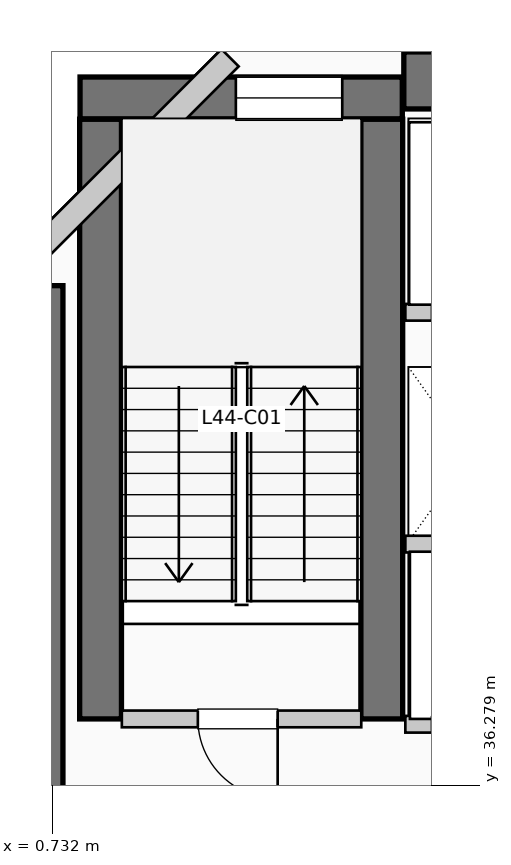
"""IFC4 building model, lengths in metres.
Left out: names, types, materials, properties, quantities, classifications, styles, units other than length and angle.
Written with IfcOpenShell. Run it as: python <this file> out.ifc"""

import sys

from ifc_helpers import new_model, si_unit, direction, frame, frame_2d, origin, place, context, subcontext, project, spatial, rectangle, extrude, element, fill, save


model = new_model("IFC4")
c1 = context("Model", 3, precision=1e-05, world=origin(), true_north=direction((0.0, 1.0)))
c2 = subcontext(c1, "Body", "Model", "MODEL_VIEW")
j1 = project(units=[si_unit("LENGTHUNIT", "METRE"), si_unit("PLANEANGLEUNIT", "RADIAN")], contexts=[c1])
p1 = place(None, origin())
s1 = spatial("IfcSite", under=j1, at=p1, CompositionType="ELEMENT")
p2 = place(p1, origin())
s2 = spatial("IfcBuilding", under=s1, at=p2, CompositionType="ELEMENT")
p3 = place(p2, frame((0.0, 0.0, 183.48)))
s3 = spatial("IfcBuildingStorey", under=s2, at=p3, CompositionType="ELEMENT", Elevation=183.48)
p4 = place(p3, frame((5.36, 45.55, 0.0), z_axis=(0.0, 0.0, 1.0), x_axis=(1.0, 0.0, 0.0)))
e1 = element("IfcWall", 1, at=p4, inside=s3, PredefinedType="SHEAR", context=c2, shape_type="SweptSolid", body=[
    extrude(rectangle(XDim=13.98, YDim=0.75, at=frame_2d((6.99, 0.0))), origin(), (0.0, 0.0, 1.0), 3.96),
])
p5 = place(p3, frame((0.5, 34.95, 0.0), z_axis=(0.0, 0.0, 1.0), x_axis=(0.0, 1.0, 0.0)))
e2 = element("IfcWall", 2, at=p5, inside=s3, PredefinedType="SHEAR", context=c2, shape_type="SweptSolid", body=[
    extrude(rectangle(XDim=7.9, YDim=0.75, at=frame_2d((3.95, 0.0))), origin(), (0.0, 0.0, 1.0), 3.96),
])
for number, where, z_axis, x_axis in (
    (3, (1.37, 37.15, 0.0), (0.0, 0.0, 1.0), (0.0, 1.0, 0.0)),
    (4, (5.07, 37.15, 0.0), (0.0, 0.0, 1.0), (0.0, 1.0, 0.0)),
):
    element("IfcWall", number, at=place(p3, frame(where, z_axis=z_axis, x_axis=x_axis)), inside=s3, PredefinedType="SHEAR", context=c2, shape_type="SweptSolid", body=[
        extrude(rectangle(XDim=7.89, YDim=0.55, at=frame_2d((3.945, 0.0))), origin(), (0.0, 0.0, 1.0), 3.96),
    ])
p6 = place(p3, frame((1.1, 45.32, 0.0), z_axis=(0.0, 0.0, 1.0), x_axis=(1.0, 0.0, 0.0)))
e5 = element("IfcWall", 5, at=p6, inside=s3, PredefinedType="SHEAR", context=c2, shape_type="SweptSolid", body=[
    extrude(rectangle(XDim=4.24, YDim=0.55, at=frame_2d((2.12, 0.0))), origin(), (0.0, 0.0, 1.0), 3.96),
])
p7 = place(p6, frame((2.05, 0.0, 1.05)))
e6 = element("IfcOpeningElement", 6, at=p7, cuts=e5, PredefinedType="OPENING", context=c2, shape_type="SweptSolid", body=[
    extrude(rectangle(XDim=1.4, YDim=1.8, at=frame_2d((0.7, 0.9))), frame((0.0, 0.285, 0.0), z_axis=(0.0, -1.0, 0.0), x_axis=(1.0, 0.0, 0.0)), (0.0, 0.0, 1.0), 0.57),
])
p8 = place(p3, frame((3.074, 45.848, 0.0), z_axis=(0.0, 0.0, 1.0), x_axis=(-0.707106781187, -0.707106781187, 0.0)))
e7 = element("IfcWall", 7, at=p8, inside=s3, PredefinedType="SOLIDWALL", context=c2, shape_type="SweptSolid", body=[
    extrude(rectangle(XDim=4.133, YDim=0.32, at=frame_2d((2.066, 0.0))), origin(), (0.0, 0.0, 1.0), 3.71),
])
p9 = place(p3, frame((1.65, 37.15, 0.0), z_axis=(0.0, 0.0, 1.0), x_axis=(1.0, 0.0, 0.0)))
e8 = element("IfcWall", 8, at=p9, inside=s3, PredefinedType="PARTITIONING", context=c2, shape_type="SweptSolid", body=[
    extrude(rectangle(XDim=3.15, YDim=0.22, at=frame_2d((1.575, 0.0))), origin(), (0.0, 0.0, 1.0), 3.71),
])
p10 = place(p9, frame((2.05, 0.0, 0.0), z_axis=(0.0, 0.0, 1.0), x_axis=(-1.0, 0.0, 0.0)))
e9 = element("IfcOpeningElement", 9, at=p10, cuts=e8, PredefinedType="OPENING", context=c2, shape_type="SweptSolid", body=[
    extrude(rectangle(XDim=1.05, YDim=2.15, at=frame_2d((0.525, 1.075))), frame((0.0, 0.12, 0.0), z_axis=(0.0, -1.0, 0.0), x_axis=(1.0, 0.0, 0.0)), (0.0, 0.0, 1.0), 0.24),
])
p11 = place(p3, frame((5.38, 37.08, 0.0), z_axis=(0.0, 0.0, 1.0), x_axis=(1.0, 0.0, 0.0)))
e10 = element("IfcWall", 10, at=p11, inside=s3, PredefinedType="PARTITIONING", context=c2, shape_type="SweptSolid", body=[
    extrude(rectangle(XDim=3.46, YDim=0.22, at=frame_2d((1.73, 0.0))), origin(), (0.0, 0.0, 1.0), 3.71),
])
p12 = place(p11, frame((1.55, 0.0, 0.0), z_axis=(0.0, 0.0, 1.0), x_axis=(-1.0, 0.0, 0.0)))
e11 = element("IfcOpeningElement", 11, at=p12, cuts=e10, PredefinedType="OPENING", context=c2, shape_type="SweptSolid", body=[
    extrude(rectangle(XDim=1.2, YDim=2.2, at=frame_2d((0.6, 1.1))), frame((0.0, 0.12, 0.0), z_axis=(0.0, -1.0, 0.0), x_axis=(1.0, 0.0, 0.0)), (0.0, 0.0, 1.0), 0.24),
])
p13 = place(p11, frame((3.22, 0.0, 0.0), z_axis=(0.0, 0.0, 1.0), x_axis=(-1.0, 0.0, 0.0)))
e12 = element("IfcOpeningElement", 12, at=p13, cuts=e10, PredefinedType="OPENING", context=c2, shape_type="SweptSolid", body=[
    extrude(rectangle(XDim=1.2, YDim=2.2, at=frame_2d((0.6, 1.1))), frame((0.0, 0.12, 0.0), z_axis=(0.0, -1.0, 0.0), x_axis=(1.0, 0.0, 0.0)), (0.0, 0.0, 1.0), 0.24),
])
p14 = place(p3, frame((5.38, 39.45, 0.0), z_axis=(0.0, 0.0, 1.0), x_axis=(1.0, 0.0, 0.0)))
e13 = element("IfcWall", 13, at=p14, inside=s3, PredefinedType="PARTITIONING", context=c2, shape_type="SweptSolid", body=[
    extrude(rectangle(XDim=3.46, YDim=0.22, at=frame_2d((1.73, 0.0))), origin(), (0.0, 0.0, 1.0), 3.71),
])
p15 = place(p3, frame((5.38, 42.5, 0.0), z_axis=(0.0, 0.0, 1.0), x_axis=(1.0, 0.0, 0.0)))
e14 = element("IfcWall", 14, at=p15, inside=s3, PredefinedType="PARTITIONING", context=c2, shape_type="SweptSolid", body=[
    extrude(rectangle(XDim=3.77, YDim=0.22, at=frame_2d((1.885, 0.0))), origin(), (0.0, 0.0, 1.0), 3.71),
])
p16 = place(p15, frame((1.75, 0.0, 0.0), z_axis=(0.0, 0.0, 1.0), x_axis=(-1.0, 0.0, 0.0)))
e15 = element("IfcOpeningElement", 15, at=p16, cuts=e14, PredefinedType="OPENING", context=c2, shape_type="SweptSolid", body=[
    extrude(rectangle(XDim=1.4, YDim=2.2, at=frame_2d((0.7, 1.1))), frame((0.0, 0.12, 0.0), z_axis=(0.0, -1.0, 0.0), x_axis=(1.0, 0.0, 0.0)), (0.0, 0.0, 1.0), 0.24),
])
p17 = place(p15, frame((3.53, 0.0, 0.0), z_axis=(0.0, 0.0, 1.0), x_axis=(-1.0, 0.0, 0.0)))
e16 = element("IfcOpeningElement", 16, at=p17, cuts=e14, PredefinedType="OPENING", context=c2, shape_type="SweptSolid", body=[
    extrude(rectangle(XDim=1.4, YDim=2.2, at=frame_2d((0.7, 1.1))), frame((0.0, 0.12, 0.0), z_axis=(0.0, -1.0, 0.0), x_axis=(1.0, 0.0, 0.0)), (0.0, 0.0, 1.0), 0.24),
])
p18 = place(p7, origin())
e17 = element("IfcWindow", 17, at=p18, inside=s3, PartitioningType="SINGLE_PANEL", PredefinedType="WINDOW", context=c2, shape_type="SweptSolid", body=[
    extrude(rectangle(XDim=1.4, YDim=1.8, at=frame_2d((0.7, 0.9))), frame((0.0, 0.03, 0.0), z_axis=(0.0, -1.0, 0.0), x_axis=(1.0, 0.0, 0.0)), (0.0, 0.0, 1.0), 0.06),
])
fill(e6, e17)
p19 = place(p10, origin())
e18 = element("IfcDoor", 18, at=p19, inside=s3, OperationType="SINGLE_SWING_RIGHT", PredefinedType="DOOR", context=c2, shape_type="SweptSolid", body=[
    extrude(rectangle(XDim=1.05, YDim=2.15, at=frame_2d((0.525, 1.075))), frame((0.0, 0.025, 0.0), z_axis=(0.0, -1.0, 0.0), x_axis=(1.0, 0.0, 0.0)), (0.0, 0.0, 1.0), 0.05),
])
fill(e9, e18)
save(model, sys.argv[1])
